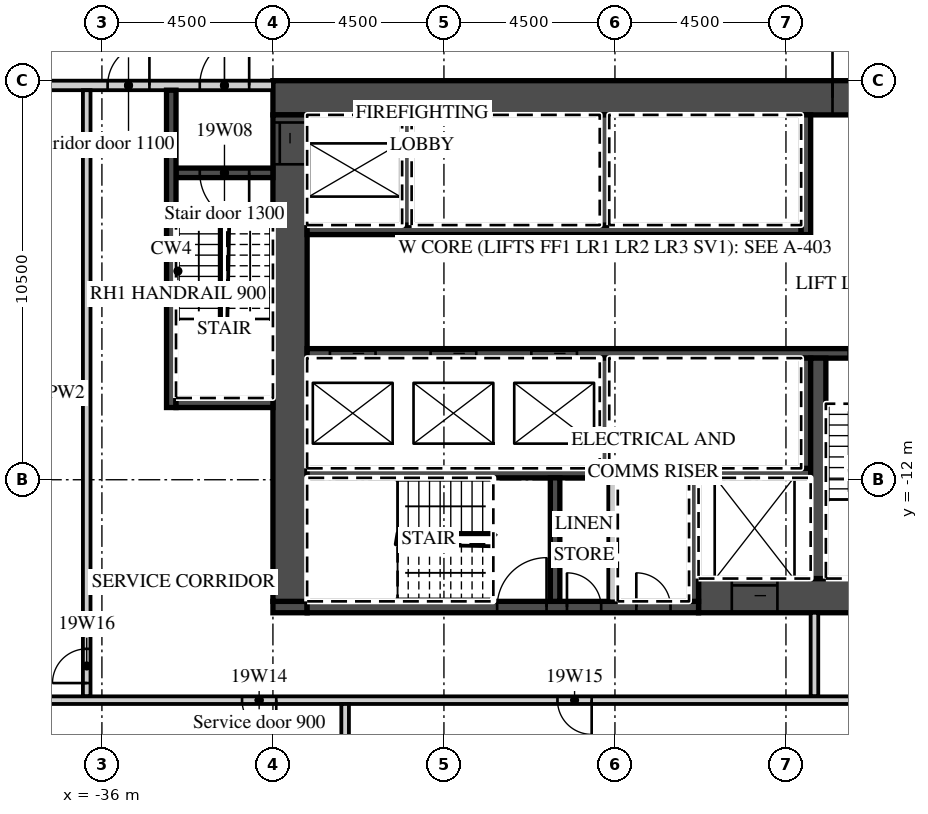
"""IFC4 building model, lengths in metres.
Left out: names, types, materials, properties, quantities, classifications, styles, units other than length and angle.
Written with IfcOpenShell. Run it as: python <this file> out.ifc"""

import sys

from ifc_helpers import new_model, si_unit, direction, frame, frame_2d, origin, place, context, subcontext, project, spatial, rectangle, extrude, element, fill, save


model = new_model("IFC4")
c1 = context("Model", 3, precision=1e-05, world=origin(), true_north=direction((0.0, 1.0)))
c2 = subcontext(c1, "Body", "Model", "MODEL_VIEW")
j1 = project(units=[si_unit("LENGTHUNIT", "METRE"), si_unit("PLANEANGLEUNIT", "RADIAN")], contexts=[c1])
p1 = place(None, origin())
s1 = spatial("IfcSite", under=j1, at=p1, CompositionType="ELEMENT")
p2 = place(p1, origin())
s2 = spatial("IfcBuilding", under=s1, at=p2, CompositionType="ELEMENT")
p3 = place(p2, frame((0.0, 0.0, 93.0)))
s3 = spatial("IfcBuildingStorey", under=s2, at=p3, CompositionType="ELEMENT", Elevation=93.0)
p4 = place(p3, frame((-31.5, -1.95, 0.0), z_axis=(0.0, 0.0, 1.0), x_axis=(1.0, 0.0, 0.0)))
e1 = element("IfcWall", 1, at=p4, inside=s3, PredefinedType="SHEAR", context=c2, shape_type="SweptSolid", body=[
    extrude(rectangle(XDim=18.0, YDim=0.9, at=frame_2d((9.0, 0.0))), origin(), (0.0, 0.0, 1.0), 3.02),
])
p5 = place(p4, frame((14.725, 0.0, 0.0)))
e2 = element("IfcOpeningElement", 2, at=p5, cuts=e1, PredefinedType="OPENING", context=c2, shape_type="SweptSolid", body=[
    extrude(rectangle(XDim=1.8, YDim=2.1, at=frame_2d((0.9, 1.05))), frame((0.0, 0.46, 0.0), z_axis=(0.0, -1.0, 0.0), x_axis=(1.0, 0.0, 0.0)), (0.0, 0.0, 1.0), 0.92),
])
p6 = place(p3, frame((-20.3, -15.05, 0.0), z_axis=(0.0, 0.0, 1.0), x_axis=(1.0, 0.0, 0.0)))
e3 = element("IfcWall", 3, at=p6, inside=s3, PredefinedType="SHEAR", context=c2, shape_type="SweptSolid", body=[
    extrude(rectangle(XDim=6.8, YDim=0.9, at=frame_2d((3.4, 0.0))), origin(), (0.0, 0.0, 1.0), 3.02),
])
p7 = place(p6, frame((0.875, 0.0, 0.0)))
e4 = element("IfcOpeningElement", 4, at=p7, cuts=e3, PredefinedType="OPENING", context=c2, shape_type="SweptSolid", body=[
    extrude(rectangle(XDim=1.2, YDim=2.1, at=frame_2d((0.6, 1.05))), frame((0.0, 0.46, 0.0), z_axis=(0.0, -1.0, 0.0), x_axis=(1.0, 0.0, 0.0)), (0.0, 0.0, 1.0), 0.92),
])
p8 = place(p3, frame((-31.5, -15.35, 0.0), z_axis=(0.0, 0.0, 1.0), x_axis=(1.0, 0.0, 0.0)))
e5 = element("IfcWall", 5, at=p8, inside=s3, PredefinedType="SHEAR", context=c2, shape_type="SweptSolid", body=[
    extrude(rectangle(XDim=0.9, YDim=0.3, at=frame_2d((0.45, 0.0))), origin(), (0.0, 0.0, 1.0), 3.02),
])
p9 = place(p3, frame((-30.6, -15.35, 0.0), z_axis=(0.0, 0.0, 1.0), x_axis=(1.0, 0.0, 0.0)))
e6 = element("IfcWall", 6, at=p9, inside=s3, PredefinedType="SHEAR", context=c2, shape_type="SweptSolid", body=[
    extrude(rectangle(XDim=10.3, YDim=0.3, at=frame_2d((5.15, 0.0))), origin(), (0.0, 0.0, 1.0), 3.02),
])
p10 = place(p9, frame((5.0, 0.0, 0.0)))
e7 = element("IfcOpeningElement", 7, at=p10, cuts=e6, PredefinedType="OPENING", context=c2, shape_type="SweptSolid", body=[
    extrude(rectangle(XDim=1.3, YDim=2.1, at=frame_2d((0.65, 1.05))), frame((0.0, 0.16, 0.0), z_axis=(0.0, -1.0, 0.0), x_axis=(1.0, 0.0, 0.0)), (0.0, 0.0, 1.0), 0.32),
])
p11 = place(p9, frame((6.837, 0.0, 0.0)))
e8 = element("IfcOpeningElement", 8, at=p11, cuts=e6, PredefinedType="OPENING", context=c2, shape_type="SweptSolid", body=[
    extrude(rectangle(XDim=0.9, YDim=2.1, at=frame_2d((0.45, 1.05))), frame((0.0, 0.16, 0.0), z_axis=(0.0, -1.0, 0.0), x_axis=(1.0, 0.0, 0.0)), (0.0, 0.0, 1.0), 0.32),
])
p12 = place(p9, frame((8.663, 0.0, 0.0)))
e9 = element("IfcOpeningElement", 9, at=p12, cuts=e6, PredefinedType="OPENING", context=c2, shape_type="SweptSolid", body=[
    extrude(rectangle(XDim=0.9, YDim=2.1, at=frame_2d((0.45, 1.05))), frame((0.0, 0.16, 0.0), z_axis=(0.0, -1.0, 0.0), x_axis=(1.0, 0.0, 0.0)), (0.0, 0.0, 1.0), 0.32),
])
p13 = place(p3, frame((-31.05, -15.2, 0.0), z_axis=(0.0, 0.0, 1.0), x_axis=(0.0, 1.0, 0.0)))
e10 = element("IfcWall", 10, at=p13, inside=s3, PredefinedType="SHEAR", context=c2, shape_type="SweptSolid", body=[
    extrude(rectangle(XDim=12.8, YDim=0.9, at=frame_2d((6.4, 0.0))), origin(), (0.0, 0.0, 1.0), 3.02),
])
p14 = place(p13, frame((11.5, 0.0, 0.0)))
e11 = element("IfcOpeningElement", 11, at=p14, cuts=e10, PredefinedType="OPENING", context=c2, shape_type="SweptSolid", body=[
    extrude(rectangle(XDim=1.1, YDim=2.1, at=frame_2d((0.55, 1.05))), frame((0.0, 0.46, 0.0), z_axis=(0.0, -1.0, 0.0), x_axis=(1.0, 0.0, 0.0)), (0.0, 0.0, 1.0), 0.92),
])
p15 = place(p3, frame((-30.6, -5.425, 0.0), z_axis=(0.0, 0.0, 1.0), x_axis=(1.0, 0.0, 0.0)))
e12 = element("IfcWall", 12, at=p15, inside=s3, PredefinedType="SHEAR", context=c2, shape_type="SweptSolid", body=[
    extrude(rectangle(XDim=13.0, YDim=0.25, at=frame_2d((6.5, 0.0))), origin(), (0.0, 0.0, 1.0), 3.02),
])
p16 = place(p3, frame((-17.475, -5.55, 0.0), z_axis=(0.0, 0.0, 1.0), x_axis=(0.0, 1.0, 0.0)))
e13 = element("IfcWall", 13, at=p16, inside=s3, PredefinedType="SHEAR", context=c2, shape_type="SweptSolid", body=[
    extrude(rectangle(XDim=3.15, YDim=0.25, at=frame_2d((1.575, 0.0))), origin(), (0.0, 0.0, 1.0), 3.02),
])
for number, where, z_axis, x_axis in (
    (14, (-27.975, -5.3, 0.0), (0.0, 0.0, 1.0), (0.0, 1.0, 0.0)),
    (15, (-22.775, -5.3, 0.0), (0.0, 0.0, 1.0), (0.0, 1.0, 0.0)),
):
    element("IfcWall", number, at=place(p3, frame(where, z_axis=z_axis, x_axis=x_axis)), inside=s3, PredefinedType="SHEAR", context=c2, shape_type="SweptSolid", body=[
        extrude(rectangle(XDim=2.9, YDim=0.25, at=frame_2d((1.45, 0.0))), origin(), (0.0, 0.0, 1.0), 3.02),
    ])
p17 = place(p3, frame((-30.6, -8.675, 0.0), z_axis=(0.0, 0.0, 1.0), x_axis=(1.0, 0.0, 0.0)))
e16 = element("IfcWall", 16, at=p17, inside=s3, PredefinedType="SHEAR", context=c2, shape_type="SweptSolid", body=[
    extrude(rectangle(XDim=16.2, YDim=0.25, at=frame_2d((8.1, 0.0))), origin(), (0.0, 0.0, 1.0), 3.02),
])
p18 = place(p17, frame((0.6, 0.0, 0.0)))
e17 = element("IfcOpeningElement", 17, at=p18, cuts=e16, PredefinedType="OPENING", context=c2, shape_type="SweptSolid", body=[
    extrude(rectangle(XDim=1.2, YDim=2.1, at=frame_2d((0.6, 1.05))), frame((0.0, 0.135, 0.0), z_axis=(0.0, -1.0, 0.0), x_axis=(1.0, 0.0, 0.0)), (0.0, 0.0, 1.0), 0.27),
])
p19 = place(p17, frame((3.25, 0.0, 0.0)))
e18 = element("IfcOpeningElement", 18, at=p19, cuts=e16, PredefinedType="OPENING", context=c2, shape_type="SweptSolid", body=[
    extrude(rectangle(XDim=1.2, YDim=2.1, at=frame_2d((0.6, 1.05))), frame((0.0, 0.135, 0.0), z_axis=(0.0, -1.0, 0.0), x_axis=(1.0, 0.0, 0.0)), (0.0, 0.0, 1.0), 0.27),
])
p20 = place(p17, frame((5.9, 0.0, 0.0)))
e19 = element("IfcOpeningElement", 19, at=p20, cuts=e16, PredefinedType="OPENING", context=c2, shape_type="SweptSolid", body=[
    extrude(rectangle(XDim=1.2, YDim=2.1, at=frame_2d((0.6, 1.05))), frame((0.0, 0.135, 0.0), z_axis=(0.0, -1.0, 0.0), x_axis=(1.0, 0.0, 0.0)), (0.0, 0.0, 1.0), 0.27),
])
p21 = place(p17, frame((14.25, 0.0, 0.0)))
e20 = element("IfcOpeningElement", 20, at=p21, cuts=e16, PredefinedType="OPENING", context=c2, shape_type="SweptSolid", body=[
    extrude(rectangle(XDim=1.3, YDim=2.1, at=frame_2d((0.65, 1.05))), frame((0.0, 0.135, 0.0), z_axis=(0.0, -1.0, 0.0), x_axis=(1.0, 0.0, 0.0)), (0.0, 0.0, 1.0), 0.27),
])
p22 = place(p3, frame((-30.6, -11.825, 0.0), z_axis=(0.0, 0.0, 1.0), x_axis=(1.0, 0.0, 0.0)))
e21 = element("IfcWall", 21, at=p22, inside=s3, PredefinedType="SHEAR", context=c2, shape_type="SweptSolid", body=[
    extrude(rectangle(XDim=13.25, YDim=0.25, at=frame_2d((6.625, 0.0))), origin(), (0.0, 0.0, 1.0), 3.02),
])
for number, where, z_axis, x_axis in (
    (22, (-17.475, -11.7, 0.0), (0.0, 0.0, 1.0), (0.0, 1.0, 0.0)),
    (23, (-22.775, -11.7, 0.0), (0.0, 0.0, 1.0), (0.0, 1.0, 0.0)),
):
    element("IfcWall", number, at=place(p3, frame(where, z_axis=z_axis, x_axis=x_axis)), inside=s3, PredefinedType="SHEAR", context=c2, shape_type="SweptSolid", body=[
        extrude(rectangle(XDim=2.9, YDim=0.25, at=frame_2d((1.45, 0.0))), origin(), (0.0, 0.0, 1.0), 3.02),
    ])
p23 = place(p3, frame((-17.15, -14.6, 0.0), z_axis=(0.0, 0.0, 1.0), x_axis=(0.0, 1.0, 0.0)))
e24 = element("IfcWall", 24, at=p23, inside=s3, PredefinedType="SHEAR", context=c2, shape_type="SweptSolid", body=[
    extrude(rectangle(XDim=5.8, YDim=0.4, at=frame_2d((2.9, 0.0))), origin(), (0.0, 0.0, 1.0), 3.02),
])
for number, where, z_axis, x_axis in (
    (25, (-20.425, -15.2, 0.0), (0.0, 0.0, 1.0), (0.0, 1.0, 0.0)),
    (26, (-24.075, -15.2, 0.0), (0.0, 0.0, 1.0), (0.0, 1.0, 0.0)),
):
    element("IfcWall", number, at=place(p3, frame(where, z_axis=z_axis, x_axis=x_axis)), inside=s3, PredefinedType="SHEAR", context=c2, shape_type="SweptSolid", body=[
        extrude(rectangle(XDim=3.25, YDim=0.25, at=frame_2d((1.625, 0.0))), origin(), (0.0, 0.0, 1.0), 3.02),
    ])
p24 = place(p3, frame((-22.55, -15.2, 0.0), z_axis=(0.0, 0.0, 1.0), x_axis=(0.0, 1.0, 0.0)))
e27 = element("IfcWall", 27, at=p24, inside=s3, PredefinedType="PARTITIONING", context=c2, shape_type="SweptSolid", body=[
    extrude(rectangle(XDim=3.25, YDim=0.25, at=frame_2d((1.625, 0.0))), origin(), (0.0, 0.0, 1.0), 3.02),
])
p25 = place(p3, frame((-44.55, -1.625, 0.0), z_axis=(0.0, 0.0, 1.0), x_axis=(1.0, 0.0, 0.0)))
e28 = element("IfcWall", 28, at=p25, inside=s3, PredefinedType="PARTITIONING", context=c2, shape_type="SweptSolid", body=[
    extrude(rectangle(XDim=13.05, YDim=0.25, at=frame_2d((6.525, 0.0))), origin(), (0.0, 0.0, 1.0), 3.02),
])
p26 = place(p25, frame((11.125, 0.0, 0.0)))
e29 = element("IfcOpeningElement", 29, at=p26, cuts=e28, PredefinedType="OPENING", context=c2, shape_type="SweptSolid", body=[
    extrude(rectangle(XDim=1.3, YDim=2.1, at=frame_2d((0.65, 1.05))), frame((0.0, 0.135, 0.0), z_axis=(0.0, -1.0, 0.0), x_axis=(1.0, 0.0, 0.0)), (0.0, 0.0, 1.0), 0.27),
])
p27 = place(p25, frame((8.7, 0.0, 0.0)))
e30 = element("IfcOpeningElement", 30, at=p27, cuts=e28, PredefinedType="OPENING", context=c2, shape_type="SweptSolid", body=[
    extrude(rectangle(XDim=1.1, YDim=2.1, at=frame_2d((0.55, 1.05))), frame((0.0, 0.135, 0.0), z_axis=(0.0, -1.0, 0.0), x_axis=(1.0, 0.0, 0.0)), (0.0, 0.0, 1.0), 0.27),
])
p28 = place(p3, frame((-34.05, -3.925, 0.0), z_axis=(0.0, 0.0, 1.0), x_axis=(1.0, 0.0, 0.0)))
e31 = element("IfcWall", 31, at=p28, inside=s3, PredefinedType="SHEAR", context=c2, shape_type="SweptSolid", body=[
    extrude(rectangle(XDim=2.55, YDim=0.25, at=frame_2d((1.275, 0.0))), origin(), (0.0, 0.0, 1.0), 3.02),
])
p29 = place(p28, frame((0.625, 0.0, 0.0)))
e32 = element("IfcOpeningElement", 32, at=p29, cuts=e31, PredefinedType="OPENING", context=c2, shape_type="SweptSolid", body=[
    extrude(rectangle(XDim=1.3, YDim=2.1, at=frame_2d((0.65, 1.05))), frame((0.0, 0.135, 0.0), z_axis=(0.0, -1.0, 0.0), x_axis=(1.0, 0.0, 0.0)), (0.0, 0.0, 1.0), 0.27),
])
p30 = place(p3, frame((-34.175, -10.1, 0.0), z_axis=(0.0, 0.0, 1.0), x_axis=(0.0, 1.0, 0.0)))
e33 = element("IfcWall", 33, at=p30, inside=s3, PredefinedType="SHEAR", context=c2, shape_type="SweptSolid", body=[
    extrude(rectangle(XDim=8.35, YDim=0.25, at=frame_2d((4.175, 0.0))), origin(), (0.0, 0.0, 1.0), 3.02),
])
p31 = place(p3, frame((-34.05, -9.975, 0.0), z_axis=(0.0, 0.0, 1.0), x_axis=(1.0, 0.0, 0.0)))
e34 = element("IfcWall", 34, at=p31, inside=s3, PredefinedType="SHEAR", context=c2, shape_type="SweptSolid", body=[
    extrude(rectangle(XDim=2.55, YDim=0.25, at=frame_2d((1.275, 0.0))), origin(), (0.0, 0.0, 1.0), 3.02),
])
p32 = place(p3, frame((-17.25, -17.7, 0.0), z_axis=(0.0, 0.0, 1.0), x_axis=(0.0, 1.0, 0.0)))
e35 = element("IfcWall", 35, at=p32, inside=s3, PredefinedType="PARTITIONING", context=c2, shape_type="SweptSolid", body=[
    extrude(rectangle(XDim=2.2, YDim=0.2, at=frame_2d((1.1, 0.0))), origin(), (0.0, 0.0, 1.0), 3.02),
])
p33 = place(p3, frame((-36.4, -17.7, 0.0), z_axis=(0.0, 0.0, 1.0), x_axis=(0.0, 1.0, 0.0)))
e36 = element("IfcWall", 36, at=p33, inside=s3, PredefinedType="PARTITIONING", context=c2, shape_type="SweptSolid", body=[
    extrude(rectangle(XDim=15.95, YDim=0.2, at=frame_2d((7.975, 0.0))), origin(), (0.0, 0.0, 1.0), 3.02),
])
p34 = place(p33, frame((0.35, 0.0, 0.0)))
e37 = element("IfcOpeningElement", 37, at=p34, cuts=e36, PredefinedType="OPENING", context=c2, shape_type="SweptSolid", body=[
    extrude(rectangle(XDim=0.9, YDim=2.1, at=frame_2d((0.45, 1.05))), frame((0.0, 0.11, 0.0), z_axis=(0.0, -1.0, 0.0), x_axis=(1.0, 0.0, 0.0)), (0.0, 0.0, 1.0), 0.22),
])
p35 = place(p3, frame((-44.55, -17.8, 0.0), z_axis=(0.0, 0.0, 1.0), x_axis=(1.0, 0.0, 0.0)))
e38 = element("IfcWall", 38, at=p35, inside=s3, PredefinedType="PARTITIONING", context=c2, shape_type="SweptSolid", body=[
    extrude(rectangle(XDim=30.95, YDim=0.2, at=frame_2d((15.475, 0.0))), origin(), (0.0, 0.0, 1.0), 3.02),
])
p36 = place(p35, frame((12.238, 0.0, 0.0)))
e39 = element("IfcOpeningElement", 39, at=p36, cuts=e38, PredefinedType="OPENING", context=c2, shape_type="SweptSolid", body=[
    extrude(rectangle(XDim=0.9, YDim=2.1, at=frame_2d((0.45, 1.05))), frame((0.0, 0.11, 0.0), z_axis=(0.0, -1.0, 0.0), x_axis=(1.0, 0.0, 0.0)), (0.0, 0.0, 1.0), 0.22),
])
p37 = place(p35, frame((20.538, 0.0, 0.0)))
e40 = element("IfcOpeningElement", 40, at=p37, cuts=e38, PredefinedType="OPENING", context=c2, shape_type="SweptSolid", body=[
    extrude(rectangle(XDim=0.9, YDim=2.1, at=frame_2d((0.45, 1.05))), frame((0.0, 0.11, 0.0), z_axis=(0.0, -1.0, 0.0), x_axis=(1.0, 0.0, 0.0)), (0.0, 0.0, 1.0), 0.22),
])
p38 = place(p3, frame((-29.6, -21.55, 0.0), z_axis=(0.0, 0.0, 1.0), x_axis=(0.0, 1.0, 0.0)))
e41 = element("IfcWall", 41, at=p38, inside=s3, PredefinedType="PARTITIONING", context=c2, shape_type="SweptSolid", body=[
    extrude(rectangle(XDim=3.65, YDim=0.2, at=frame_2d((1.825, 0.0))), origin(), (0.0, 0.0, 1.0), 3.02),
])
p39 = place(p18, origin())
e42 = element("IfcDoor", 42, at=p39, inside=s3, OperationType="SLIDING_TO_LEFT", PredefinedType="DOOR", context=c2, shape_type="SweptSolid", body=[
    extrude(rectangle(XDim=1.2, YDim=2.1, at=frame_2d((0.6, 1.05))), frame((0.0, 0.025, 0.0), z_axis=(0.0, -1.0, 0.0), x_axis=(1.0, 0.0, 0.0)), (0.0, 0.0, 1.0), 0.05),
])
fill(e17, e42)
p40 = place(p19, origin())
e43 = element("IfcDoor", 43, at=p40, inside=s3, OperationType="SLIDING_TO_RIGHT", PredefinedType="DOOR", context=c2, shape_type="SweptSolid", body=[
    extrude(rectangle(XDim=1.2, YDim=2.1, at=frame_2d((0.6, 1.05))), frame((0.0, 0.025, 0.0), z_axis=(0.0, -1.0, 0.0), x_axis=(1.0, 0.0, 0.0)), (0.0, 0.0, 1.0), 0.05),
])
fill(e18, e43)
p41 = place(p20, origin())
e44 = element("IfcDoor", 44, at=p41, inside=s3, OperationType="SLIDING_TO_RIGHT", PredefinedType="DOOR", context=c2, shape_type="SweptSolid", body=[
    extrude(rectangle(XDim=1.2, YDim=2.1, at=frame_2d((0.6, 1.05))), frame((0.0, 0.025, 0.0), z_axis=(0.0, -1.0, 0.0), x_axis=(1.0, 0.0, 0.0)), (0.0, 0.0, 1.0), 0.05),
])
fill(e19, e44)
p42 = place(p7, origin())
e45 = element("IfcDoor", 45, at=p42, inside=s3, OperationType="SLIDING_TO_LEFT", PredefinedType="DOOR", context=c2, shape_type="SweptSolid", body=[
    extrude(rectangle(XDim=1.2, YDim=2.1, at=frame_2d((0.6, 1.05))), frame((0.0, 0.025, 0.0), z_axis=(0.0, -1.0, 0.0), x_axis=(1.0, 0.0, 0.0)), (0.0, 0.0, 1.0), 0.05),
])
fill(e4, e45)
p43 = place(p14, origin())
e46 = element("IfcDoor", 46, at=p43, inside=s3, OperationType="SLIDING_TO_RIGHT", PredefinedType="DOOR", context=c2, shape_type="SweptSolid", body=[
    extrude(rectangle(XDim=1.1, YDim=2.1, at=frame_2d((0.55, 1.05))), frame((0.0, 0.025, 0.0), z_axis=(0.0, -1.0, 0.0), x_axis=(1.0, 0.0, 0.0)), (0.0, 0.0, 1.0), 0.05),
])
fill(e11, e46)
p44 = place(p5, origin())
e47 = element("IfcDoor", 47, at=p44, inside=s3, OperationType="DOUBLE_DOOR_DOUBLE_SWING", PredefinedType="DOOR", context=c2, shape_type="SweptSolid", body=[
    extrude(rectangle(XDim=1.8, YDim=2.1, at=frame_2d((0.9, 1.05))), frame((0.0, 0.025, 0.0), z_axis=(0.0, -1.0, 0.0), x_axis=(1.0, 0.0, 0.0)), (0.0, 0.0, 1.0), 0.05),
])
fill(e2, e47)
p45 = place(p26, origin())
e48 = element("IfcDoor", 48, at=p45, inside=s3, OperationType="SINGLE_SWING_RIGHT", PredefinedType="DOOR", context=c2, shape_type="SweptSolid", body=[
    extrude(rectangle(XDim=1.3, YDim=2.1, at=frame_2d((0.65, 1.05))), frame((0.0, 0.025, 0.0), z_axis=(0.0, -1.0, 0.0), x_axis=(1.0, 0.0, 0.0)), (0.0, 0.0, 1.0), 0.05),
])
fill(e29, e48)
p46 = place(p29, origin())
e49 = element("IfcDoor", 49, at=p46, inside=s3, OperationType="SINGLE_SWING_RIGHT", PredefinedType="DOOR", context=c2, shape_type="SweptSolid", body=[
    extrude(rectangle(XDim=1.3, YDim=2.1, at=frame_2d((0.65, 1.05))), frame((0.0, 0.025, 0.0), z_axis=(0.0, -1.0, 0.0), x_axis=(1.0, 0.0, 0.0)), (0.0, 0.0, 1.0), 0.05),
])
fill(e32, e49)
p47 = place(p27, origin())
e50 = element("IfcDoor", 50, at=p47, inside=s3, OperationType="SINGLE_SWING_RIGHT", PredefinedType="DOOR", context=c2, shape_type="SweptSolid", body=[
    extrude(rectangle(XDim=1.1, YDim=2.1, at=frame_2d((0.55, 1.05))), frame((0.0, 0.025, 0.0), z_axis=(0.0, -1.0, 0.0), x_axis=(1.0, 0.0, 0.0)), (0.0, 0.0, 1.0), 0.05),
])
fill(e30, e50)
p48 = place(p21, origin())
e51 = element("IfcDoor", 51, at=p48, inside=s3, OperationType="SINGLE_SWING_RIGHT", PredefinedType="DOOR", context=c2, shape_type="SweptSolid", body=[
    extrude(rectangle(XDim=1.3, YDim=2.1, at=frame_2d((0.65, 1.05))), frame((0.0, 0.025, 0.0), z_axis=(0.0, -1.0, 0.0), x_axis=(1.0, 0.0, 0.0)), (0.0, 0.0, 1.0), 0.05),
])
fill(e20, e51)
p49 = place(p10, origin())
e52 = element("IfcDoor", 52, at=p49, inside=s3, OperationType="SINGLE_SWING_RIGHT", PredefinedType="DOOR", context=c2, shape_type="SweptSolid", body=[
    extrude(rectangle(XDim=1.3, YDim=2.1, at=frame_2d((0.65, 1.05))), frame((0.0, 0.025, 0.0), z_axis=(0.0, -1.0, 0.0), x_axis=(1.0, 0.0, 0.0)), (0.0, 0.0, 1.0), 0.05),
])
fill(e7, e52)
p50 = place(p11, origin())
e53 = element("IfcDoor", 53, at=p50, inside=s3, OperationType="SINGLE_SWING_LEFT", PredefinedType="DOOR", context=c2, shape_type="SweptSolid", body=[
    extrude(rectangle(XDim=0.9, YDim=2.1, at=frame_2d((0.45, 1.05))), frame((0.0, 0.025, 0.0), z_axis=(0.0, -1.0, 0.0), x_axis=(1.0, 0.0, 0.0)), (0.0, 0.0, 1.0), 0.05),
])
fill(e8, e53)
p51 = place(p12, origin())
e54 = element("IfcDoor", 54, at=p51, inside=s3, OperationType="SINGLE_SWING_LEFT", PredefinedType="DOOR", context=c2, shape_type="SweptSolid", body=[
    extrude(rectangle(XDim=0.9, YDim=2.1, at=frame_2d((0.45, 1.05))), frame((0.0, 0.025, 0.0), z_axis=(0.0, -1.0, 0.0), x_axis=(1.0, 0.0, 0.0)), (0.0, 0.0, 1.0), 0.05),
])
fill(e9, e54)
p52 = place(p36, origin())
e55 = element("IfcDoor", 55, at=p52, inside=s3, OperationType="SINGLE_SWING_RIGHT", PredefinedType="DOOR", context=c2, shape_type="SweptSolid", body=[
    extrude(rectangle(XDim=0.9, YDim=2.1, at=frame_2d((0.45, 1.05))), frame((0.0, 0.025, 0.0), z_axis=(0.0, -1.0, 0.0), x_axis=(1.0, 0.0, 0.0)), (0.0, 0.0, 1.0), 0.05),
])
fill(e39, e55)
p53 = place(p37, origin())
e56 = element("IfcDoor", 56, at=p53, inside=s3, OperationType="SINGLE_SWING_RIGHT", PredefinedType="DOOR", context=c2, shape_type="SweptSolid", body=[
    extrude(rectangle(XDim=0.9, YDim=2.1, at=frame_2d((0.45, 1.05))), frame((0.0, 0.025, 0.0), z_axis=(0.0, -1.0, 0.0), x_axis=(1.0, 0.0, 0.0)), (0.0, 0.0, 1.0), 0.05),
])
fill(e40, e56)
p54 = place(p34, origin())
e57 = element("IfcDoor", 57, at=p54, inside=s3, OperationType="SINGLE_SWING_LEFT", PredefinedType="DOOR", context=c2, shape_type="SweptSolid", body=[
    extrude(rectangle(XDim=0.9, YDim=2.1, at=frame_2d((0.45, 1.05))), frame((0.0, 0.025, 0.0), z_axis=(0.0, -1.0, 0.0), x_axis=(1.0, 0.0, 0.0)), (0.0, 0.0, 1.0), 0.05),
])
fill(e37, e57)
save(model, sys.argv[1])
